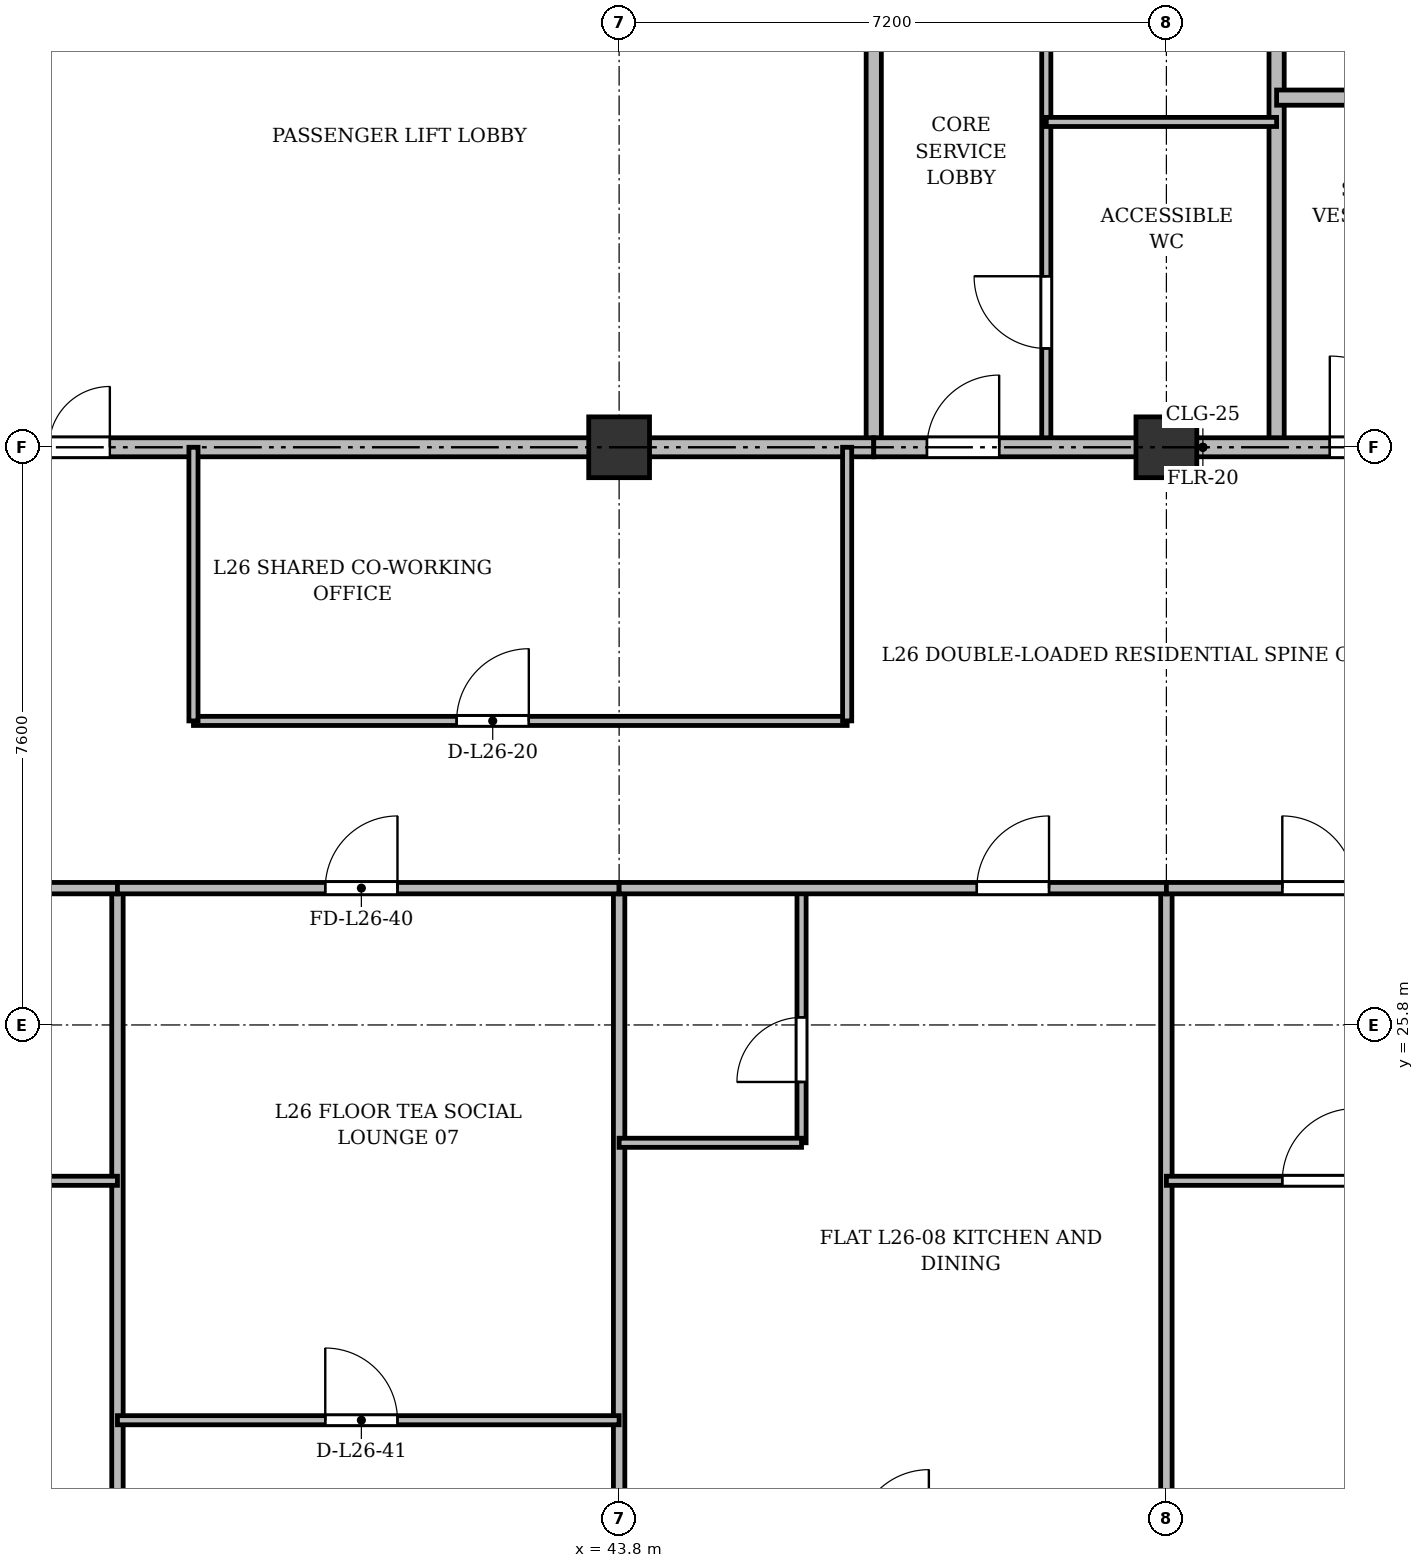
"""IFC4 building model, lengths in metres.
Left out: names, types, materials, properties, quantities, classifications, styles, units other than length and angle.
Written with IfcOpenShell. Run it as: python <this file> out.ifc"""

import sys

from ifc_helpers import new_model, si_unit, direction, frame, frame_2d, origin, origin_2d, place, context, subcontext, project, spatial, rectangle, extrude, source, transform, mapped, element, fill, save


model = new_model("IFC4")
c1 = context("Model", 3, precision=1e-05, world=origin(), true_north=direction((0.0, 1.0)))
c2 = subcontext(c1, "Body", "Model", "MODEL_VIEW")
j1 = project(units=[si_unit("LENGTHUNIT", "METRE"), si_unit("PLANEANGLEUNIT", "RADIAN")], contexts=[c1])
p1 = place(None, origin())
s1 = spatial("IfcSite", under=j1, at=p1, CompositionType="ELEMENT")
p2 = place(p1, origin())
s2 = spatial("IfcBuilding", under=s1, at=p2, CompositionType="ELEMENT")
p3 = place(p2, frame((0.0, 0.0, 103.3)))
s3 = spatial("IfcBuildingStorey", under=s2, at=p3, CompositionType="ELEMENT", Elevation=103.3)
m1 = source(origin(), c2, "Body", "SweptSolid", [
    extrude(rectangle(XDim=0.8, YDim=0.8, at=origin_2d()), origin(), (0.0, 0.0, 1.0), 3.6),
])
for number, where, z_axis, x_axis in (
    (1, (43.8, 33.4, 0.0), (0.0, 0.0, 1.0), (1.0, 0.0, 0.0)),
    (2, (51.0, 33.4, 0.0), (0.0, 0.0, 1.0), (1.0, 0.0, 0.0)),
):
    element("IfcColumn", number, at=place(p3, frame(where, z_axis=z_axis, x_axis=x_axis)), inside=s3, PredefinedType="COLUMN", context=c2, shape_type="MappedRepresentation", body=[
        mapped(m1, transform((0.0, 0.0, 0.0), x_axis=(1.0, 0.0, 0.0), y_axis=(0.0, 1.0, 0.0), z_axis=(0.0, 0.0, 1.0), scale=1.0)),
    ])
p4 = place(p3, frame((47.15, 33.4, 0.0), z_axis=(0.0, 0.0, 1.0), x_axis=(0.0, 1.0, 0.0)))
e3 = element("IfcWall", 3, at=p4, inside=s3, PredefinedType="SOLIDWALL", context=c2, shape_type="SweptSolid", body=[
    extrude(rectangle(XDim=11.3, YDim=0.2, at=frame_2d((5.65, 0.0))), origin(), (0.0, 0.0, 1.0), 2.752),
])
p5 = place(p3, frame((26.3, 33.4, 0.0), z_axis=(0.0, 0.0, 1.0), x_axis=(1.0, 0.0, 0.0)))
e4 = element("IfcWall", 4, at=p5, inside=s3, PredefinedType="PARTITIONING", context=c2, shape_type="SweptSolid", body=[
    extrude(rectangle(XDim=20.85, YDim=0.25, at=frame_2d((10.425, 0.0))), origin(), (0.0, 0.0, 1.0), 2.752),
])
p6 = place(p5, frame((9.2, 0.0, 0.0)))
e5 = element("IfcOpeningElement", 5, at=p6, cuts=e4, PredefinedType="OPENING", context=c2, shape_type="SweptSolid", body=[
    extrude(rectangle(XDim=1.6, YDim=2.2, at=frame_2d((0.8, 1.1))), frame((0.0, 0.135, 0.0), z_axis=(0.0, -1.0, 0.0), x_axis=(1.0, 0.0, 0.0)), (0.0, 0.0, 1.0), 0.27),
])
p7 = place(p3, frame((52.45, 33.4, 0.0), z_axis=(0.0, 0.0, 1.0), x_axis=(0.0, 1.0, 0.0)))
e6 = element("IfcWall", 6, at=p7, inside=s3, PredefinedType="PARTITIONING", context=c2, shape_type="SweptSolid", body=[
    extrude(rectangle(XDim=8.65, YDim=0.2, at=frame_2d((4.325, 0.0))), origin(), (0.0, 0.0, 1.0), 2.752),
])
p8 = place(p7, frame((6.2, 0.0, 0.0)))
e7 = element("IfcOpeningElement", 7, at=p8, cuts=e6, PredefinedType="OPENING", context=c2, shape_type="SweptSolid", body=[
    extrude(rectangle(XDim=0.95, YDim=2.15, at=frame_2d((0.475, 1.075))), frame((0.0, 0.11, 0.0), z_axis=(0.0, -1.0, 0.0), x_axis=(1.0, 0.0, 0.0)), (0.0, 0.0, 1.0), 0.22),
])
p9 = place(p3, frame((52.45, 38.0, 0.0), z_axis=(0.0, 0.0, 1.0), x_axis=(1.0, 0.0, 0.0)))
e8 = element("IfcWall", 8, at=p9, inside=s3, PredefinedType="PARTITIONING", context=c2, shape_type="SweptSolid", body=[
    extrude(rectangle(XDim=2.55, YDim=0.2, at=frame_2d((1.275, 0.0))), origin(), (0.0, 0.0, 1.0), 3.34),
])
p10 = place(p3, frame((49.42, 33.4, 0.0), z_axis=(0.0, 0.0, 1.0), x_axis=(0.0, 1.0, 0.0)))
e9 = element("IfcWall", 9, at=p10, inside=s3, PredefinedType="PARTITIONING", context=c2, shape_type="SweptSolid", body=[
    extrude(rectangle(XDim=8.6, YDim=0.12, at=frame_2d((4.3, 0.0))), origin(), (0.0, 0.0, 1.0), 2.752),
])
p11 = place(p10, frame((1.3, 0.0, 0.0)))
e10 = element("IfcOpeningElement", 10, at=p11, cuts=e9, PredefinedType="OPENING", context=c2, shape_type="SweptSolid", body=[
    extrude(rectangle(XDim=0.95, YDim=2.15, at=frame_2d((0.475, 1.075))), frame((0.0, 0.07, 0.0), z_axis=(0.0, -1.0, 0.0), x_axis=(1.0, 0.0, 0.0)), (0.0, 0.0, 1.0), 0.14),
])
p12 = place(p10, frame((5.5, 0.0, 0.0)))
e11 = element("IfcOpeningElement", 11, at=p12, cuts=e9, PredefinedType="OPENING", context=c2, shape_type="SweptSolid", body=[
    extrude(rectangle(XDim=0.95, YDim=2.15, at=frame_2d((0.475, 1.075))), frame((0.0, 0.07, 0.0), z_axis=(0.0, -1.0, 0.0), x_axis=(1.0, 0.0, 0.0)), (0.0, 0.0, 1.0), 0.14),
])
p13 = place(p3, frame((49.42, 37.68, 0.0), z_axis=(0.0, 0.0, 1.0), x_axis=(1.0, 0.0, 0.0)))
e12 = element("IfcWall", 12, at=p13, inside=s3, PredefinedType="PARTITIONING", context=c2, shape_type="SweptSolid", body=[
    extrude(rectangle(XDim=3.03, YDim=0.12, at=frame_2d((1.515, 0.0))), origin(), (0.0, 0.0, 1.0), 2.84),
])
p14 = place(p3, frame((47.15, 33.4, 0.0), z_axis=(0.0, 0.0, 1.0), x_axis=(1.0, 0.0, 0.0)))
e13 = element("IfcWall", 13, at=p14, inside=s3, PredefinedType="PARTITIONING", context=c2, shape_type="SweptSolid", body=[
    extrude(rectangle(XDim=11.15, YDim=0.25, at=frame_2d((5.575, 0.0))), origin(), (0.0, 0.0, 1.0), 2.752),
])
p15 = place(p14, frame((0.7, 0.0, 0.0)))
e14 = element("IfcOpeningElement", 14, at=p15, cuts=e13, PredefinedType="OPENING", context=c2, shape_type="SweptSolid", body=[
    extrude(rectangle(XDim=0.95, YDim=2.15, at=frame_2d((0.475, 1.075))), frame((0.0, 0.135, 0.0), z_axis=(0.0, -1.0, 0.0), x_axis=(1.0, 0.0, 0.0)), (0.0, 0.0, 1.0), 0.27),
])
p16 = place(p14, frame((6.0, 0.0, 0.0)))
e15 = element("IfcOpeningElement", 15, at=p16, cuts=e13, PredefinedType="OPENING", context=c2, shape_type="SweptSolid", body=[
    extrude(rectangle(XDim=1.2, YDim=2.15, at=frame_2d((0.6, 1.075))), frame((0.0, 0.135, 0.0), z_axis=(0.0, -1.0, 0.0), x_axis=(1.0, 0.0, 0.0)), (0.0, 0.0, 1.0), 0.27),
])
p17 = place(p3, frame((38.2, 29.8, 0.0), z_axis=(0.0, 0.0, 1.0), x_axis=(1.0, 0.0, 0.0)))
e16 = element("IfcWall", 16, at=p17, inside=s3, PredefinedType="PARTITIONING", context=c2, shape_type="SweptSolid", body=[
    extrude(rectangle(XDim=8.6, YDim=0.12, at=frame_2d((4.3, 0.0))), origin(), (0.0, 0.0, 1.0), 2.84),
])
p18 = place(p17, frame((3.462, 0.0, 0.0)))
e17 = element("IfcOpeningElement", 17, at=p18, cuts=e16, PredefinedType="OPENING", context=c2, shape_type="SweptSolid", body=[
    extrude(rectangle(XDim=0.95, YDim=2.15, at=frame_2d((0.475, 1.075))), frame((0.0, 0.07, 0.0), z_axis=(0.0, -1.0, 0.0), x_axis=(1.0, 0.0, 0.0)), (0.0, 0.0, 1.0), 0.14),
])
for number, where, z_axis, x_axis in (
    (18, (38.2, 29.8, 0.0), (0.0, 0.0, 1.0), (0.0, 1.0, 0.0)),
    (19, (46.8, 29.8, 0.0), (0.0, 0.0, 1.0), (0.0, 1.0, 0.0)),
):
    element("IfcWall", number, at=place(p3, frame(where, z_axis=z_axis, x_axis=x_axis)), inside=s3, PredefinedType="PARTITIONING", context=c2, shape_type="SweptSolid", body=[
        extrude(rectangle(XDim=3.6, YDim=0.12, at=frame_2d((1.8, 0.0))), origin(), (0.0, 0.0, 1.0), 2.752),
    ])
p19 = place(p3, frame((37.2, 3.145, 0.0), z_axis=(0.0, 0.0, 1.0), x_axis=(0.0, 1.0, 0.0)))
e20 = element("IfcWall", 20, at=p19, inside=s3, PredefinedType="PARTITIONING", context=c2, shape_type="SweptSolid", body=[
    extrude(rectangle(XDim=24.455, YDim=0.15, at=frame_2d((12.228, 0.0))), origin(), (0.0, 0.0, 1.0), 2.752),
])
for number, where, z_axis, x_axis in (
    (21, (43.8, 3.145, 0.0), (0.0, 0.0, 1.0), (0.0, 1.0, 0.0)),
    (22, (51.0, 3.145, 0.0), (0.0, 0.0, 1.0), (0.0, 1.0, 0.0)),
):
    element("IfcWall", number, at=place(p3, frame(where, z_axis=z_axis, x_axis=x_axis)), inside=s3, PredefinedType="PARTITIONING", context=c2, shape_type="SweptSolid", body=[
        extrude(rectangle(XDim=24.455, YDim=0.15, at=frame_2d((12.228, 0.0))), origin(), (0.0, 0.0, 1.0), 2.84),
    ])
p20 = place(p3, frame((30.6, 27.6, 0.0), z_axis=(0.0, 0.0, 1.0), x_axis=(1.0, 0.0, 0.0)))
e23 = element("IfcWall", 23, at=p20, inside=s3, PredefinedType="PARTITIONING", context=c2, shape_type="SweptSolid", body=[
    extrude(rectangle(XDim=6.6, YDim=0.15, at=frame_2d((3.3, 0.0))), origin(), (0.0, 0.0, 1.0), 2.84),
])
p21 = place(p20, frame((2.734, 0.0, 0.0)))
e24 = element("IfcOpeningElement", 24, at=p21, cuts=e23, PredefinedType="OPENING", context=c2, shape_type="SweptSolid", body=[
    extrude(rectangle(XDim=0.95, YDim=2.15, at=frame_2d((0.475, 1.075))), frame((0.0, 0.085, 0.0), z_axis=(0.0, -1.0, 0.0), x_axis=(1.0, 0.0, 0.0)), (0.0, 0.0, 1.0), 0.17),
])
p22 = place(p3, frame((30.6, 23.75, 0.0), z_axis=(0.0, 0.0, 1.0), x_axis=(1.0, 0.0, 0.0)))
e25 = element("IfcWall", 25, at=p22, inside=s3, PredefinedType="PARTITIONING", context=c2, shape_type="SweptSolid", body=[
    extrude(rectangle(XDim=6.6, YDim=0.12, at=frame_2d((3.3, 0.0))), origin(), (0.0, 0.0, 1.0), 2.84),
])
p23 = place(p22, frame((2.734, 0.0, 0.0)))
e26 = element("IfcOpeningElement", 26, at=p23, cuts=e25, PredefinedType="OPENING", context=c2, shape_type="SweptSolid", body=[
    extrude(rectangle(XDim=0.95, YDim=2.15, at=frame_2d((0.475, 1.075))), frame((0.0, 0.07, 0.0), z_axis=(0.0, -1.0, 0.0), x_axis=(1.0, 0.0, 0.0)), (0.0, 0.0, 1.0), 0.14),
])
p24 = place(p3, frame((37.2, 27.6, 0.0), z_axis=(0.0, 0.0, 1.0), x_axis=(1.0, 0.0, 0.0)))
e27 = element("IfcWall", 27, at=p24, inside=s3, PredefinedType="PARTITIONING", context=c2, shape_type="SweptSolid", body=[
    extrude(rectangle(XDim=6.6, YDim=0.15, at=frame_2d((3.3, 0.0))), origin(), (0.0, 0.0, 1.0), 2.84),
])
p25 = place(p24, frame((2.734, 0.0, 0.0)))
e28 = element("IfcOpeningElement", 28, at=p25, cuts=e27, PredefinedType="OPENING", context=c2, shape_type="SweptSolid", body=[
    extrude(rectangle(XDim=0.95, YDim=2.15, at=frame_2d((0.475, 1.075))), frame((0.0, 0.085, 0.0), z_axis=(0.0, -1.0, 0.0), x_axis=(1.0, 0.0, 0.0)), (0.0, 0.0, 1.0), 0.17),
])
p26 = place(p3, frame((37.2, 20.6, 0.0), z_axis=(0.0, 0.0, 1.0), x_axis=(1.0, 0.0, 0.0)))
e29 = element("IfcWall", 29, at=p26, inside=s3, PredefinedType="PARTITIONING", context=c2, shape_type="SweptSolid", body=[
    extrude(rectangle(XDim=6.6, YDim=0.12, at=frame_2d((3.3, 0.0))), origin(), (0.0, 0.0, 1.0), 2.84),
])
p27 = place(p26, frame((2.734, 0.0, 0.0)))
e30 = element("IfcOpeningElement", 30, at=p27, cuts=e29, PredefinedType="OPENING", context=c2, shape_type="SweptSolid", body=[
    extrude(rectangle(XDim=0.95, YDim=2.15, at=frame_2d((0.475, 1.075))), frame((0.0, 0.07, 0.0), z_axis=(0.0, -1.0, 0.0), x_axis=(1.0, 0.0, 0.0)), (0.0, 0.0, 1.0), 0.14),
])
p28 = place(p3, frame((46.2, 24.25, 0.0), z_axis=(0.0, 0.0, 1.0), x_axis=(0.0, 1.0, 0.0)))
e31 = element("IfcWall", 31, at=p28, inside=s3, PredefinedType="PARTITIONING", context=c2, shape_type="SweptSolid", body=[
    extrude(rectangle(XDim=3.35, YDim=0.12, at=frame_2d((1.675, 0.0))), origin(), (0.0, 0.0, 1.0), 2.99),
])
p29 = place(p28, frame((0.8, 0.0, 0.0)))
e32 = element("IfcOpeningElement", 32, at=p29, cuts=e31, PredefinedType="OPENING", context=c2, shape_type="SweptSolid", body=[
    extrude(rectangle(XDim=0.85, YDim=2.1, at=frame_2d((0.425, 1.05))), frame((0.0, 0.07, 0.0), z_axis=(0.0, -1.0, 0.0), x_axis=(1.0, 0.0, 0.0)), (0.0, 0.0, 1.0), 0.14),
])
p30 = place(p3, frame((43.8, 24.25, 0.0), z_axis=(0.0, 0.0, 1.0), x_axis=(1.0, 0.0, 0.0)))
e33 = element("IfcWall", 33, at=p30, inside=s3, PredefinedType="PARTITIONING", context=c2, shape_type="SweptSolid", body=[
    extrude(rectangle(XDim=2.4, YDim=0.12, at=frame_2d((1.2, 0.0))), origin(), (0.0, 0.0, 1.0), 2.84),
])
p31 = place(p3, frame((43.8, 27.6, 0.0), z_axis=(0.0, 0.0, 1.0), x_axis=(1.0, 0.0, 0.0)))
e34 = element("IfcWall", 34, at=p31, inside=s3, PredefinedType="PARTITIONING", context=c2, shape_type="SweptSolid", body=[
    extrude(rectangle(XDim=7.2, YDim=0.15, at=frame_2d((3.6, 0.0))), origin(), (0.0, 0.0, 1.0), 2.84),
])
p32 = place(p31, frame((4.706, 0.0, 0.0)))
e35 = element("IfcOpeningElement", 35, at=p32, cuts=e34, PredefinedType="OPENING", context=c2, shape_type="SweptSolid", body=[
    extrude(rectangle(XDim=0.95, YDim=2.15, at=frame_2d((0.475, 1.075))), frame((0.0, 0.085, 0.0), z_axis=(0.0, -1.0, 0.0), x_axis=(1.0, 0.0, 0.0)), (0.0, 0.0, 1.0), 0.17),
])
p33 = place(p3, frame((51.0, 27.6, 0.0), z_axis=(0.0, 0.0, 1.0), x_axis=(1.0, 0.0, 0.0)))
e36 = element("IfcWall", 36, at=p33, inside=s3, PredefinedType="PARTITIONING", context=c2, shape_type="SweptSolid", body=[
    extrude(rectangle(XDim=4.0, YDim=0.15, at=frame_2d((2.0, 0.0))), origin(), (0.0, 0.0, 1.0), 2.84),
])
p34 = place(p33, frame((1.525, 0.0, 0.0)))
e37 = element("IfcOpeningElement", 37, at=p34, cuts=e36, PredefinedType="OPENING", context=c2, shape_type="SweptSolid", body=[
    extrude(rectangle(XDim=0.95, YDim=2.15, at=frame_2d((0.475, 1.075))), frame((0.0, 0.085, 0.0), z_axis=(0.0, -1.0, 0.0), x_axis=(1.0, 0.0, 0.0)), (0.0, 0.0, 1.0), 0.17),
])
p35 = place(p3, frame((51.0, 23.75, 0.0), z_axis=(0.0, 0.0, 1.0), x_axis=(1.0, 0.0, 0.0)))
e38 = element("IfcWall", 38, at=p35, inside=s3, PredefinedType="PARTITIONING", context=c2, shape_type="SweptSolid", body=[
    extrude(rectangle(XDim=4.0, YDim=0.12, at=frame_2d((2.0, 0.0))), origin(), (0.0, 0.0, 1.0), 2.84),
])
p36 = place(p35, frame((1.525, 0.0, 0.0)))
e39 = element("IfcOpeningElement", 39, at=p36, cuts=e38, PredefinedType="OPENING", context=c2, shape_type="SweptSolid", body=[
    extrude(rectangle(XDim=0.95, YDim=2.15, at=frame_2d((0.475, 1.075))), frame((0.0, 0.07, 0.0), z_axis=(0.0, -1.0, 0.0), x_axis=(1.0, 0.0, 0.0)), (0.0, 0.0, 1.0), 0.14),
])
m2 = source(origin(), c2, "Body", "SweptSolid", [
    extrude(rectangle(XDim=1.6, YDim=2.2, at=frame_2d((0.8, 1.1))), frame((0.0, 0.025, 0.0), z_axis=(0.0, -1.0, 0.0), x_axis=(1.0, 0.0, 0.0)), (0.0, 0.0, 1.0), 0.05),
])
p37 = place(p6, origin())
e40 = element("IfcDoor", 40, at=p37, inside=s3, OperationType="DOUBLE_DOOR_SINGLE_SWING", PredefinedType="DOOR", context=c2, shape_type="MappedRepresentation", body=[
    mapped(m2, transform((0.0, 0.0, 0.0), x_axis=(1.0, 0.0, 0.0), y_axis=(0.0, 1.0, 0.0), z_axis=(0.0, 0.0, 1.0), scale=1.0)),
])
fill(e5, e40)
m3 = source(origin(), c2, "Body", "SweptSolid", [
    extrude(rectangle(XDim=0.95, YDim=2.15, at=frame_2d((0.475, 1.075))), frame((0.0, 0.025, 0.0), z_axis=(0.0, -1.0, 0.0), x_axis=(1.0, 0.0, 0.0)), (0.0, 0.0, 1.0), 0.05),
])
p38 = place(p11, origin())
e41 = element("IfcDoor", 41, at=p38, inside=s3, OperationType="SINGLE_SWING_RIGHT", PredefinedType="DOOR", context=c2, shape_type="MappedRepresentation", body=[
    mapped(m3, transform((0.0, 0.0, 0.0), x_axis=(1.0, 0.0, 0.0), y_axis=(0.0, 1.0, 0.0), z_axis=(0.0, 0.0, 1.0), scale=1.0)),
])
fill(e10, e41)
p39 = place(p15, origin())
e42 = element("IfcDoor", 42, at=p39, inside=s3, OperationType="SINGLE_SWING_RIGHT", PredefinedType="DOOR", context=c2, shape_type="MappedRepresentation", body=[
    mapped(m3, transform((0.0, 0.0, 0.0), x_axis=(1.0, 0.0, 0.0), y_axis=(0.0, 1.0, 0.0), z_axis=(0.0, 0.0, 1.0), scale=1.0)),
])
fill(e14, e42)
m4 = source(origin(), c2, "Body", "SweptSolid", [
    extrude(rectangle(XDim=1.2, YDim=2.15, at=frame_2d((0.6, 1.075))), frame((0.0, 0.025, 0.0), z_axis=(0.0, -1.0, 0.0), x_axis=(1.0, 0.0, 0.0)), (0.0, 0.0, 1.0), 0.05),
])
p40 = place(p16, origin())
e43 = element("IfcDoor", 43, at=p40, inside=s3, OperationType="SINGLE_SWING_LEFT", PredefinedType="DOOR", context=c2, shape_type="MappedRepresentation", body=[
    mapped(m4, transform((0.0, 0.0, 0.0), x_axis=(1.0, 0.0, 0.0), y_axis=(0.0, 1.0, 0.0), z_axis=(0.0, 0.0, 1.0), scale=1.0)),
])
fill(e15, e43)
p41 = place(p18, origin())
e44 = element("IfcDoor", 44, at=p41, inside=s3, OperationType="SINGLE_SWING_RIGHT", PredefinedType="DOOR", context=c2, shape_type="MappedRepresentation", body=[
    mapped(m3, transform((0.0, 0.0, 0.0), x_axis=(1.0, 0.0, 0.0), y_axis=(0.0, 1.0, 0.0), z_axis=(0.0, 0.0, 1.0), scale=1.0)),
])
fill(e17, e44)
p42 = place(p25, origin())
e45 = element("IfcDoor", 45, at=p42, inside=s3, OperationType="SINGLE_SWING_RIGHT", PredefinedType="DOOR", context=c2, shape_type="MappedRepresentation", body=[
    mapped(m3, transform((0.0, 0.0, 0.0), x_axis=(1.0, 0.0, 0.0), y_axis=(0.0, 1.0, 0.0), z_axis=(0.0, 0.0, 1.0), scale=1.0)),
])
fill(e28, e45)
p43 = place(p27, origin())
e46 = element("IfcDoor", 46, at=p43, inside=s3, OperationType="SINGLE_SWING_LEFT", PredefinedType="DOOR", context=c2, shape_type="MappedRepresentation", body=[
    mapped(m3, transform((0.0, 0.0, 0.0), x_axis=(1.0, 0.0, 0.0), y_axis=(0.0, 1.0, 0.0), z_axis=(0.0, 0.0, 1.0), scale=1.0)),
])
fill(e30, e46)
m5 = source(origin(), c2, "Body", "SweptSolid", [
    extrude(rectangle(XDim=0.85, YDim=2.1, at=frame_2d((0.425, 1.05))), frame((0.0, 0.025, 0.0), z_axis=(0.0, -1.0, 0.0), x_axis=(1.0, 0.0, 0.0)), (0.0, 0.0, 1.0), 0.05),
])
p44 = place(p29, origin())
e47 = element("IfcDoor", 47, at=p44, inside=s3, OperationType="SINGLE_SWING_LEFT", PredefinedType="DOOR", context=c2, shape_type="MappedRepresentation", body=[
    mapped(m5, transform((0.0, 0.0, 0.0), x_axis=(1.0, 0.0, 0.0), y_axis=(0.0, 1.0, 0.0), z_axis=(0.0, 0.0, 1.0), scale=1.0)),
])
fill(e32, e47)
p45 = place(p32, origin())
e48 = element("IfcDoor", 48, at=p45, inside=s3, OperationType="SINGLE_SWING_RIGHT", PredefinedType="DOOR", context=c2, shape_type="MappedRepresentation", body=[
    mapped(m3, transform((0.0, 0.0, 0.0), x_axis=(1.0, 0.0, 0.0), y_axis=(0.0, 1.0, 0.0), z_axis=(0.0, 0.0, 1.0), scale=1.0)),
])
fill(e35, e48)
p46 = place(p34, origin())
e49 = element("IfcDoor", 49, at=p46, inside=s3, OperationType="SINGLE_SWING_LEFT", PredefinedType="DOOR", context=c2, shape_type="MappedRepresentation", body=[
    mapped(m3, transform((0.0, 0.0, 0.0), x_axis=(1.0, 0.0, 0.0), y_axis=(0.0, 1.0, 0.0), z_axis=(0.0, 0.0, 1.0), scale=1.0)),
])
fill(e37, e49)
p47 = place(p36, origin())
e50 = element("IfcDoor", 50, at=p47, inside=s3, OperationType="SINGLE_SWING_RIGHT", PredefinedType="DOOR", context=c2, shape_type="MappedRepresentation", body=[
    mapped(m3, transform((0.0, 0.0, 0.0), x_axis=(1.0, 0.0, 0.0), y_axis=(0.0, 1.0, 0.0), z_axis=(0.0, 0.0, 1.0), scale=1.0)),
])
fill(e39, e50)
save(model, sys.argv[1])
